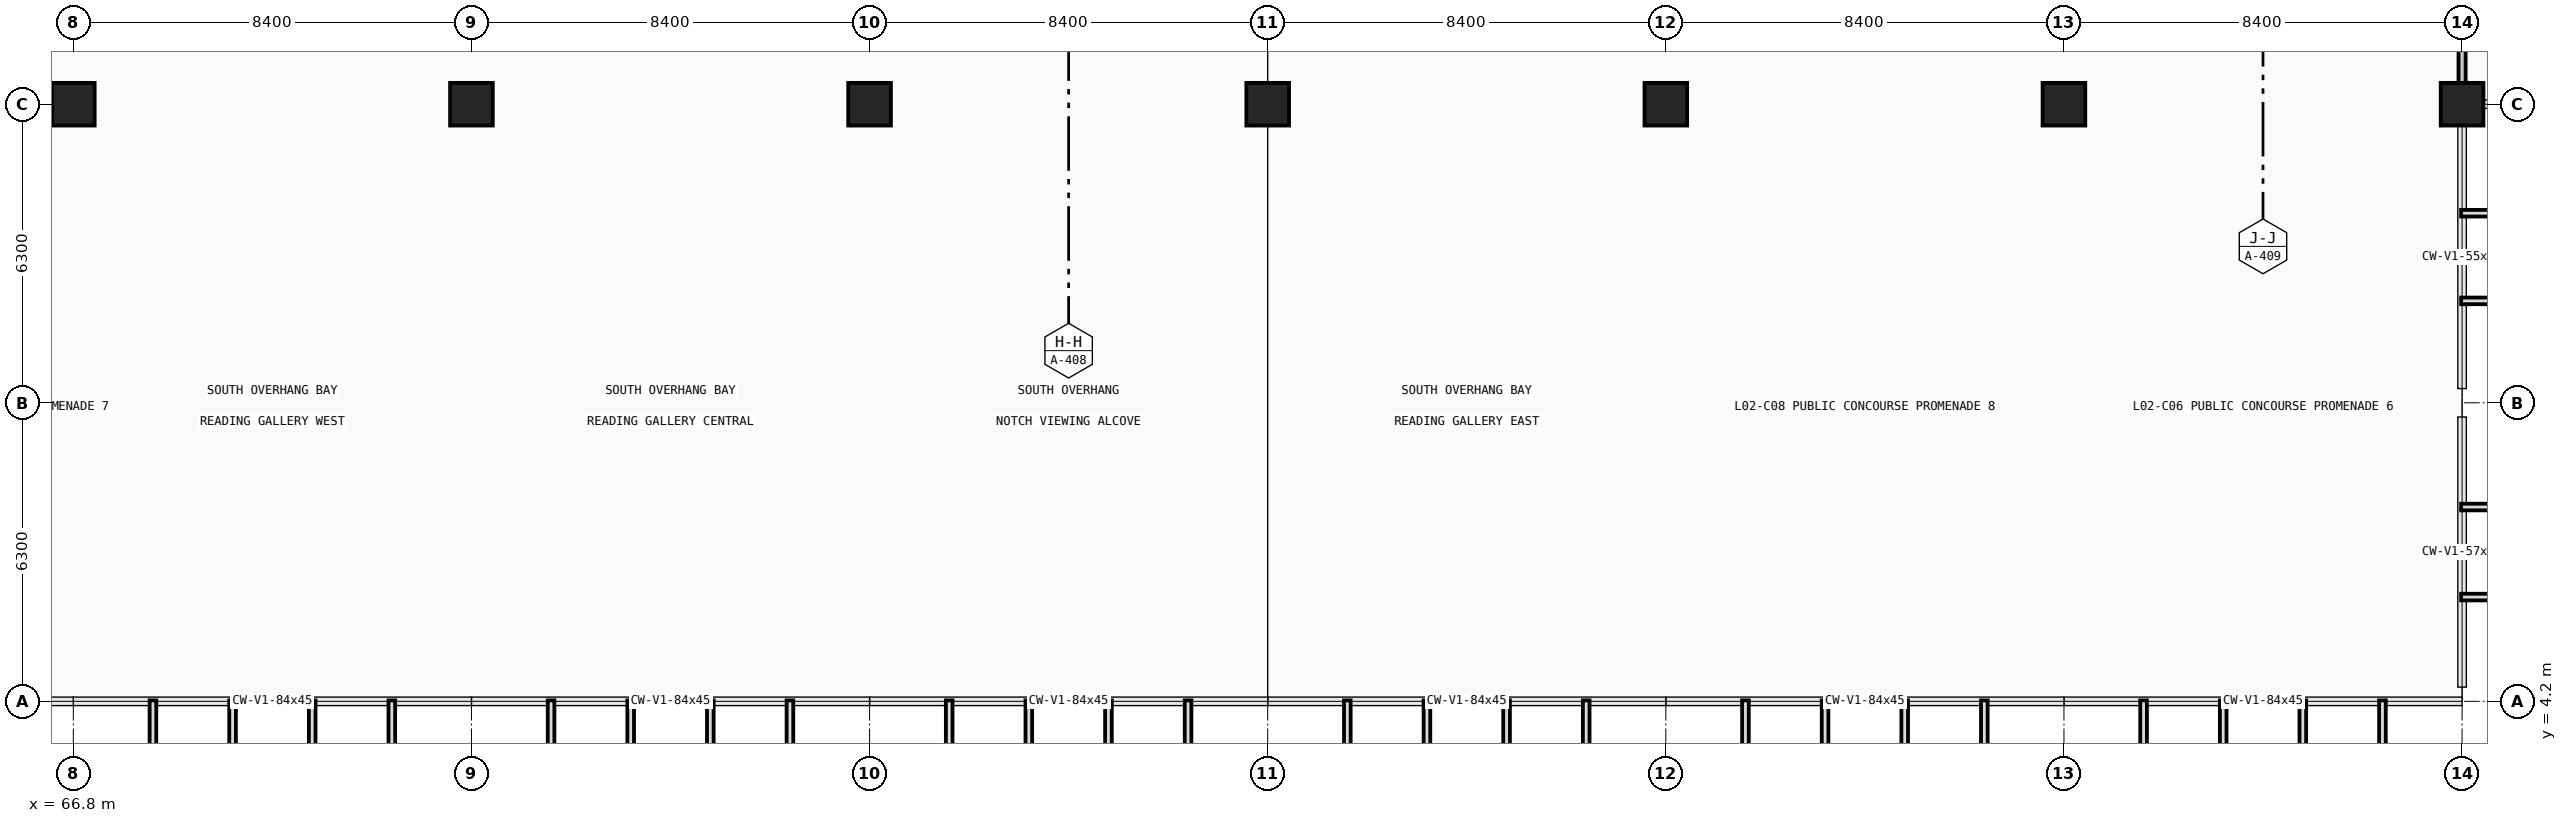
"""IFC4 building model, lengths in metres.
Left out: names, types, materials, properties, quantities, classifications, styles, units other than length and angle.
Written with IfcOpenShell. Run it as: python <this file> out.ifc"""

import sys

from ifc_helpers import new_model, si_unit, direction, frame, frame_2d, origin, origin_2d, place, context, subcontext, project, spatial, rectangle, extrude, element, save


model = new_model("IFC4")
c1 = context("Model", 3, precision=1e-05, world=origin(), true_north=direction((0.0, 1.0)))
c2 = subcontext(c1, "Body", "Model", "MODEL_VIEW")
j1 = project(units=[si_unit("LENGTHUNIT", "METRE"), si_unit("PLANEANGLEUNIT", "RADIAN")], contexts=[c1])
p1 = place(None, origin())
s1 = spatial("IfcSite", under=j1, at=p1, CompositionType="ELEMENT")
p2 = place(p1, origin())
s2 = spatial("IfcBuilding", under=s1, at=p2, CompositionType="ELEMENT")
p3 = place(p2, frame((0.0, 0.0, 9.6)))
s3 = spatial("IfcBuildingStorey", under=s2, at=p3, CompositionType="ELEMENT", Elevation=9.6)
for number, where, z_axis, x_axis in (
    (1, (66.8, 16.8, 0.0), (0.0, 0.0, 1.0), (1.0, 0.0, 0.0)),
    (2, (75.2, 16.8, 0.0), (0.0, 0.0, 1.0), (1.0, 0.0, 0.0)),
    (3, (83.6, 16.8, 0.0), (0.0, 0.0, 1.0), (1.0, 0.0, 0.0)),
    (4, (92.0, 16.8, 0.0), (0.0, 0.0, 1.0), (1.0, 0.0, 0.0)),
    (5, (100.4, 16.8, 0.0), (0.0, 0.0, 1.0), (1.0, 0.0, 0.0)),
    (6, (108.8, 16.8, 0.0), (0.0, 0.0, 1.0), (1.0, 0.0, 0.0)),
    (7, (117.2, 16.8, 0.0), (0.0, 0.0, 1.0), (1.0, 0.0, 0.0)),
):
    element("IfcColumn", number, at=place(p3, frame(where, z_axis=z_axis, x_axis=x_axis)), inside=s3, PredefinedType="COLUMN", context=c2, shape_type="SweptSolid", body=[
        extrude(rectangle(XDim=0.9, YDim=0.9, at=origin_2d()), origin(), (0.0, 0.0, 1.0), 4.8),
    ])
p4 = place(p3, frame((117.2, 17.25, 0.0), z_axis=(0.0, 0.0, 1.0), x_axis=(0.0, 1.0, 0.0)))
e8 = element("IfcWall", 8, at=p4, inside=s3, PredefinedType="PARTITIONING", context=c2, shape_type="SweptSolid", body=[
    extrude(rectangle(XDim=6.3, YDim=0.15, at=frame_2d((3.15, 0.0))), origin(), (0.0, 0.0, 1.0), 4.05),
])
save(model, sys.argv[1])
